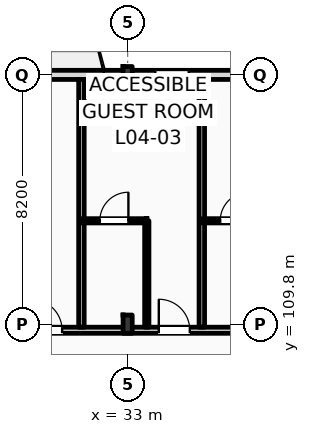
"""IFC4 building model, lengths in metres.
Left out: names, types, materials, properties, quantities, classifications, styles, units other than length and angle.
Written with IfcOpenShell. Run it as: python <this file> out.ifc"""

import sys

from ifc_helpers import new_model, si_unit, direction, frame, frame_2d, origin, origin_2d, place, context, subcontext, project, spatial, rectangle, i_section, extrude, element, fill, save


model = new_model("IFC4")
c1 = context("Model", 3, precision=1e-05, world=origin(), true_north=direction((0.0, 1.0)))
c2 = subcontext(c1, "Body", "Model", "MODEL_VIEW")
j1 = project(units=[si_unit("LENGTHUNIT", "METRE"), si_unit("PLANEANGLEUNIT", "RADIAN")], contexts=[c1])
p1 = place(None, origin())
s1 = spatial("IfcSite", under=j1, at=p1, CompositionType="ELEMENT")
p2 = place(p1, origin())
s2 = spatial("IfcBuilding", under=s1, at=p2, CompositionType="ELEMENT")
p3 = place(p2, frame((0.0, 0.0, 20.4)))
s3 = spatial("IfcBuildingStorey", under=s2, at=p3, CompositionType="ELEMENT", Elevation=20.4)
p4 = place(p3, frame((33.0, 109.8, 0.0), z_axis=(0.0, 0.0, 1.0), x_axis=(1.0, 0.0, 0.0)))
e1 = element("IfcColumn", 1, at=p4, inside=s3, PredefinedType="COLUMN", context=c2, shape_type="SweptSolid", body=[
    extrude(i_section(OverallWidth=0.3, OverallDepth=0.6, WebThickness=0.015, FlangeThickness=0.03, FilletRadius=0.027, at=origin_2d()), origin(), (0.0, 0.0, 1.0), 4.2),
])
p5 = place(p3, frame((33.0, 118.0, 0.0), z_axis=(0.0, 0.0, 1.0), x_axis=(1.0, 0.0, 0.0)))
e2 = element("IfcColumn", 2, at=p5, inside=s3, PredefinedType="COLUMN", context=c2, shape_type="SweptSolid", body=[
    extrude(i_section(OverallWidth=0.3, OverallDepth=0.55, WebThickness=0.015, FlangeThickness=0.029, FilletRadius=0.027, at=origin_2d()), origin(), (0.0, 0.0, 1.0), 4.2),
])
p6 = place(p3, frame((22.5, 118.0, 0.0), z_axis=(0.0, 0.0, 1.0), x_axis=(1.0, 0.0, 0.0)))
e3 = element("IfcWall", 3, at=p6, inside=s3, PredefinedType="STANDARD", context=c2, shape_type="SweptSolid", body=[
    extrude(rectangle(XDim=97.5, YDim=0.3, at=frame_2d((48.75, 0.0))), origin(), (0.0, 0.0, 1.0), 3.38),
])
p7 = place(p6, frame((0.91, 0.0, 0.9)))
e4 = element("IfcOpeningElement", 4, at=p7, cuts=e3, PredefinedType="OPENING", context=c2, shape_type="SweptSolid", body=[
    extrude(rectangle(XDim=0.9, YDim=1.8, at=frame_2d((0.45, 0.9))), frame((0.0, 0.16, 0.0), z_axis=(0.0, -1.0, 0.0), x_axis=(1.0, 0.0, 0.0)), (0.0, 0.0, 1.0), 0.32),
])
p8 = place(p6, frame((6.36, 0.0, 0.0)))
e5 = element("IfcOpeningElement", 5, at=p8, cuts=e3, PredefinedType="OPENING", context=c2, shape_type="SweptSolid", body=[
    extrude(rectangle(XDim=1.2, YDim=2.25, at=frame_2d((0.6, 1.125))), frame((0.0, 0.16, 0.0), z_axis=(0.0, -1.0, 0.0), x_axis=(1.0, 0.0, 0.0)), (0.0, 0.0, 1.0), 0.32),
])
p9 = place(p6, frame((11.41, 0.0, 0.9)))
e6 = element("IfcOpeningElement", 6, at=p9, cuts=e3, PredefinedType="OPENING", context=c2, shape_type="SweptSolid", body=[
    extrude(rectangle(XDim=1.1, YDim=1.9, at=frame_2d((0.55, 0.95))), frame((0.0, 0.16, 0.0), z_axis=(0.0, -1.0, 0.0), x_axis=(1.0, 0.0, 0.0)), (0.0, 0.0, 1.0), 0.32),
])
p10 = place(p6, frame((14.335, 0.0, 0.9)))
e7 = element("IfcOpeningElement", 7, at=p10, cuts=e3, PredefinedType="OPENING", context=c2, shape_type="SweptSolid", body=[
    extrude(rectangle(XDim=1.65, YDim=1.95, at=frame_2d((0.825, 0.975))), frame((0.0, 0.16, 0.0), z_axis=(0.0, -1.0, 0.0), x_axis=(1.0, 0.0, 0.0)), (0.0, 0.0, 1.0), 0.32),
])
p11 = place(p6, frame((19.26, 0.0, 0.9)))
e8 = element("IfcOpeningElement", 8, at=p11, cuts=e3, PredefinedType="OPENING", context=c2, shape_type="SweptSolid", body=[
    extrude(rectangle(XDim=1.35, YDim=2.0, at=frame_2d((0.675, 1.0))), frame((0.0, 0.16, 0.0), z_axis=(0.0, -1.0, 0.0), x_axis=(1.0, 0.0, 0.0)), (0.0, 0.0, 1.0), 0.32),
])
p12 = place(p6, frame((22.8, 0.0, 0.0)))
e9 = element("IfcOpeningElement", 9, at=p12, cuts=e3, PredefinedType="OPENING", context=c2, shape_type="SweptSolid", body=[
    extrude(rectangle(XDim=1.2, YDim=2.25, at=frame_2d((0.6, 1.125))), frame((0.0, 0.16, 0.0), z_axis=(0.0, -1.0, 0.0), x_axis=(1.0, 0.0, 0.0)), (0.0, 0.0, 1.0), 0.32),
])
p13 = place(p6, frame((26.91, 0.0, 0.9)))
e10 = element("IfcOpeningElement", 10, at=p13, cuts=e3, PredefinedType="OPENING", context=c2, shape_type="SweptSolid", body=[
    extrude(rectangle(XDim=2.1, YDim=2.1, at=frame_2d((1.05, 1.05))), frame((0.0, 0.16, 0.0), z_axis=(0.0, -1.0, 0.0), x_axis=(1.0, 0.0, 0.0)), (0.0, 0.0, 1.0), 0.32),
])
p14 = place(p6, frame((30.835, 0.0, 0.9)))
e11 = element("IfcOpeningElement", 11, at=p14, cuts=e3, PredefinedType="OPENING", context=c2, shape_type="SweptSolid", body=[
    extrude(rectangle(XDim=2.25, YDim=2.15, at=frame_2d((1.125, 1.075))), frame((0.0, 0.16, 0.0), z_axis=(0.0, -1.0, 0.0), x_axis=(1.0, 0.0, 0.0)), (0.0, 0.0, 1.0), 0.32),
])
p15 = place(p6, frame((34.96, 0.0, 0.9)))
e12 = element("IfcOpeningElement", 12, at=p15, cuts=e3, PredefinedType="OPENING", context=c2, shape_type="SweptSolid", body=[
    extrude(rectangle(XDim=2.4, YDim=2.2, at=frame_2d((1.2, 1.1))), frame((0.0, 0.16, 0.0), z_axis=(0.0, -1.0, 0.0), x_axis=(1.0, 0.0, 0.0)), (0.0, 0.0, 1.0), 0.32),
])
p16 = place(p6, frame((39.0, 0.0, 0.0)))
e13 = element("IfcOpeningElement", 13, at=p16, cuts=e3, PredefinedType="OPENING", context=c2, shape_type="SweptSolid", body=[
    extrude(rectangle(XDim=1.2, YDim=2.25, at=frame_2d((0.6, 1.125))), frame((0.0, 0.16, 0.0), z_axis=(0.0, -1.0, 0.0), x_axis=(1.0, 0.0, 0.0)), (0.0, 0.0, 1.0), 0.32),
])
p17 = place(p6, frame((43.21, 0.0, 0.9)))
e14 = element("IfcOpeningElement", 14, at=p17, cuts=e3, PredefinedType="OPENING", context=c2, shape_type="SweptSolid", body=[
    extrude(rectangle(XDim=2.7, YDim=2.3, at=frame_2d((1.35, 1.15))), frame((0.0, 0.16, 0.0), z_axis=(0.0, -1.0, 0.0), x_axis=(1.0, 0.0, 0.0)), (0.0, 0.0, 1.0), 0.32),
])
p18 = place(p6, frame((47.335, 0.0, 0.9)))
e15 = element("IfcOpeningElement", 15, at=p18, cuts=e3, PredefinedType="OPENING", context=c2, shape_type="SweptSolid", body=[
    extrude(rectangle(XDim=1.35, YDim=2.3, at=frame_2d((0.675, 1.15))), frame((0.0, 0.16, 0.0), z_axis=(0.0, -1.0, 0.0), x_axis=(1.0, 0.0, 0.0)), (0.0, 0.0, 1.0), 0.32),
])
p19 = place(p6, frame((52.74, 0.0, 0.0)))
e16 = element("IfcOpeningElement", 16, at=p19, cuts=e3, PredefinedType="OPENING", context=c2, shape_type="SweptSolid", body=[
    extrude(rectangle(XDim=1.2, YDim=2.25, at=frame_2d((0.6, 1.125))), frame((0.0, 0.16, 0.0), z_axis=(0.0, -1.0, 0.0), x_axis=(1.0, 0.0, 0.0)), (0.0, 0.0, 1.0), 0.32),
])
p20 = place(p6, frame((55.36, 0.0, 0.9)))
e17 = element("IfcOpeningElement", 17, at=p20, cuts=e3, PredefinedType="OPENING", context=c2, shape_type="SweptSolid", body=[
    extrude(rectangle(XDim=1.1, YDim=2.3, at=frame_2d((0.55, 1.15))), frame((0.0, 0.16, 0.0), z_axis=(0.0, -1.0, 0.0), x_axis=(1.0, 0.0, 0.0)), (0.0, 0.0, 1.0), 0.32),
])
p21 = place(p6, frame((59.99, 0.0, 0.9)))
e18 = element("IfcOpeningElement", 18, at=p21, cuts=e3, PredefinedType="OPENING", context=c2, shape_type="SweptSolid", body=[
    extrude(rectangle(XDim=2.74, YDim=2.3, at=frame_2d((1.37, 1.15))), frame((0.0, 0.16, 0.0), z_axis=(0.0, -1.0, 0.0), x_axis=(1.0, 0.0, 0.0)), (0.0, 0.0, 1.0), 0.32),
])
p22 = place(p6, frame((65.95, 0.0, 0.9)))
e19 = element("IfcOpeningElement", 19, at=p22, cuts=e3, PredefinedType="OPENING", context=c2, shape_type="SweptSolid", body=[
    extrude(rectangle(XDim=1.35, YDim=2.3, at=frame_2d((0.675, 1.15))), frame((0.0, 0.16, 0.0), z_axis=(0.0, -1.0, 0.0), x_axis=(1.0, 0.0, 0.0)), (0.0, 0.0, 1.0), 0.32),
])
p23 = place(p6, frame((69.16, 0.0, 0.0)))
e20 = element("IfcOpeningElement", 20, at=p23, cuts=e3, PredefinedType="OPENING", context=c2, shape_type="SweptSolid", body=[
    extrude(rectangle(XDim=1.2, YDim=2.25, at=frame_2d((0.6, 1.125))), frame((0.0, 0.16, 0.0), z_axis=(0.0, -1.0, 0.0), x_axis=(1.0, 0.0, 0.0)), (0.0, 0.0, 1.0), 0.32),
])
p24 = place(p6, frame((73.75, 0.0, 0.9)))
e21 = element("IfcOpeningElement", 21, at=p24, cuts=e3, PredefinedType="OPENING", context=c2, shape_type="SweptSolid", body=[
    extrude(rectangle(XDim=1.8, YDim=2.3, at=frame_2d((0.9, 1.15))), frame((0.0, 0.16, 0.0), z_axis=(0.0, -1.0, 0.0), x_axis=(1.0, 0.0, 0.0)), (0.0, 0.0, 1.0), 0.32),
])
p25 = place(p6, frame((76.79, 0.0, 0.9)))
e22 = element("IfcOpeningElement", 22, at=p25, cuts=e3, PredefinedType="OPENING", context=c2, shape_type="SweptSolid", body=[
    extrude(rectangle(XDim=2.74, YDim=2.3, at=frame_2d((1.37, 1.15))), frame((0.0, 0.16, 0.0), z_axis=(0.0, -1.0, 0.0), x_axis=(1.0, 0.0, 0.0)), (0.0, 0.0, 1.0), 0.32),
])
p26 = place(p6, frame((81.55, 0.0, 0.9)))
e23 = element("IfcOpeningElement", 23, at=p26, cuts=e3, PredefinedType="OPENING", context=c2, shape_type="SweptSolid", body=[
    extrude(rectangle(XDim=1.8, YDim=2.3, at=frame_2d((0.9, 1.15))), frame((0.0, 0.16, 0.0), z_axis=(0.0, -1.0, 0.0), x_axis=(1.0, 0.0, 0.0)), (0.0, 0.0, 1.0), 0.32),
])
p27 = place(p6, frame((86.01, 0.0, 0.9)))
e24 = element("IfcOpeningElement", 24, at=p27, cuts=e3, PredefinedType="OPENING", context=c2, shape_type="SweptSolid", body=[
    extrude(rectangle(XDim=1.1, YDim=1.5, at=frame_2d((0.55, 0.75))), frame((0.0, 0.16, 0.0), z_axis=(0.0, -1.0, 0.0), x_axis=(1.0, 0.0, 0.0)), (0.0, 0.0, 1.0), 0.32),
])
p28 = place(p6, frame((90.135, 0.0, 0.9)))
e25 = element("IfcOpeningElement", 25, at=p28, cuts=e3, PredefinedType="OPENING", context=c2, shape_type="SweptSolid", body=[
    extrude(rectangle(XDim=1.25, YDim=1.6, at=frame_2d((0.625, 0.8))), frame((0.0, 0.16, 0.0), z_axis=(0.0, -1.0, 0.0), x_axis=(1.0, 0.0, 0.0)), (0.0, 0.0, 1.0), 0.32),
])
p29 = place(p6, frame((94.34, 0.0, 0.9)))
e26 = element("IfcOpeningElement", 26, at=p29, cuts=e3, PredefinedType="OPENING", context=c2, shape_type="SweptSolid", body=[
    extrude(rectangle(XDim=1.4, YDim=1.7, at=frame_2d((0.7, 0.85))), frame((0.0, 0.16, 0.0), z_axis=(0.0, -1.0, 0.0), x_axis=(1.0, 0.0, 0.0)), (0.0, 0.0, 1.0), 0.32),
])
p30 = place(p3, frame((10.65, 109.6, 0.0), z_axis=(0.0, 0.0, 1.0), x_axis=(1.0, 0.0, 0.0)))
e27 = element("IfcWall", 27, at=p30, inside=s3, PredefinedType="PARTITIONING", context=c2, shape_type="SweptSolid", body=[
    extrude(rectangle(XDim=109.21, YDim=0.2, at=frame_2d((54.605, 0.0))), origin(), (0.0, 0.0, 1.0), 3.38),
])
p31 = place(p30, frame((12.535, 0.0, 0.0)))
e28 = element("IfcOpeningElement", 28, at=p31, cuts=e27, PredefinedType="OPENING", context=c2, shape_type="SweptSolid", body=[
    extrude(rectangle(XDim=1.02, YDim=2.2, at=frame_2d((0.51, 1.1))), frame((0.0, 0.11, 0.0), z_axis=(0.0, -1.0, 0.0), x_axis=(1.0, 0.0, 0.0)), (0.0, 0.0, 1.0), 0.22),
])
p32 = place(p30, frame((19.175, 0.0, 0.0)))
e29 = element("IfcOpeningElement", 29, at=p32, cuts=e27, PredefinedType="OPENING", context=c2, shape_type="SweptSolid", body=[
    extrude(rectangle(XDim=1.02, YDim=2.2, at=frame_2d((0.51, 1.1))), frame((0.0, 0.11, 0.0), z_axis=(0.0, -1.0, 0.0), x_axis=(1.0, 0.0, 0.0)), (0.0, 0.0, 1.0), 0.22),
])
p33 = place(p30, frame((23.375, 0.0, 0.0)))
e30 = element("IfcOpeningElement", 30, at=p33, cuts=e27, PredefinedType="OPENING", context=c2, shape_type="SweptSolid", body=[
    extrude(rectangle(XDim=1.02, YDim=2.2, at=frame_2d((0.51, 1.1))), frame((0.0, 0.11, 0.0), z_axis=(0.0, -1.0, 0.0), x_axis=(1.0, 0.0, 0.0)), (0.0, 0.0, 1.0), 0.22),
])
p34 = place(p30, frame((27.575, 0.0, 0.0)))
e31 = element("IfcOpeningElement", 31, at=p34, cuts=e27, PredefinedType="OPENING", context=c2, shape_type="SweptSolid", body=[
    extrude(rectangle(XDim=1.02, YDim=2.2, at=frame_2d((0.51, 1.1))), frame((0.0, 0.11, 0.0), z_axis=(0.0, -1.0, 0.0), x_axis=(1.0, 0.0, 0.0)), (0.0, 0.0, 1.0), 0.22),
])
p35 = place(p30, frame((31.805, 0.0, 0.0)))
e32 = element("IfcOpeningElement", 32, at=p35, cuts=e27, PredefinedType="OPENING", context=c2, shape_type="SweptSolid", body=[
    extrude(rectangle(XDim=0.96, YDim=2.2, at=frame_2d((0.48, 1.1))), frame((0.0, 0.11, 0.0), z_axis=(0.0, -1.0, 0.0), x_axis=(1.0, 0.0, 0.0)), (0.0, 0.0, 1.0), 0.22),
])
p36 = place(p30, frame((33.855, 0.0, 0.0)))
e33 = element("IfcOpeningElement", 33, at=p36, cuts=e27, PredefinedType="OPENING", context=c2, shape_type="SweptSolid", body=[
    extrude(rectangle(XDim=0.96, YDim=2.2, at=frame_2d((0.48, 1.1))), frame((0.0, 0.11, 0.0), z_axis=(0.0, -1.0, 0.0), x_axis=(1.0, 0.0, 0.0)), (0.0, 0.0, 1.0), 0.22),
])
p37 = place(p30, frame((40.205, 0.0, 0.0)))
e34 = element("IfcOpeningElement", 34, at=p37, cuts=e27, PredefinedType="OPENING", context=c2, shape_type="SweptSolid", body=[
    extrude(rectangle(XDim=0.96, YDim=2.2, at=frame_2d((0.48, 1.1))), frame((0.0, 0.11, 0.0), z_axis=(0.0, -1.0, 0.0), x_axis=(1.0, 0.0, 0.0)), (0.0, 0.0, 1.0), 0.22),
])
p38 = place(p30, frame((42.255, 0.0, 0.0)))
e35 = element("IfcOpeningElement", 35, at=p38, cuts=e27, PredefinedType="OPENING", context=c2, shape_type="SweptSolid", body=[
    extrude(rectangle(XDim=0.96, YDim=2.2, at=frame_2d((0.48, 1.1))), frame((0.0, 0.11, 0.0), z_axis=(0.0, -1.0, 0.0), x_axis=(1.0, 0.0, 0.0)), (0.0, 0.0, 1.0), 0.22),
])
p39 = place(p30, frame((48.605, 0.0, 0.0)))
e36 = element("IfcOpeningElement", 36, at=p39, cuts=e27, PredefinedType="OPENING", context=c2, shape_type="SweptSolid", body=[
    extrude(rectangle(XDim=0.96, YDim=2.2, at=frame_2d((0.48, 1.1))), frame((0.0, 0.11, 0.0), z_axis=(0.0, -1.0, 0.0), x_axis=(1.0, 0.0, 0.0)), (0.0, 0.0, 1.0), 0.22),
])
p40 = place(p30, frame((50.655, 0.0, 0.0)))
e37 = element("IfcOpeningElement", 37, at=p40, cuts=e27, PredefinedType="OPENING", context=c2, shape_type="SweptSolid", body=[
    extrude(rectangle(XDim=0.96, YDim=2.2, at=frame_2d((0.48, 1.1))), frame((0.0, 0.11, 0.0), z_axis=(0.0, -1.0, 0.0), x_axis=(1.0, 0.0, 0.0)), (0.0, 0.0, 1.0), 0.22),
])
p41 = place(p30, frame((57.005, 0.0, 0.0)))
e38 = element("IfcOpeningElement", 38, at=p41, cuts=e27, PredefinedType="OPENING", context=c2, shape_type="SweptSolid", body=[
    extrude(rectangle(XDim=0.96, YDim=2.2, at=frame_2d((0.48, 1.1))), frame((0.0, 0.11, 0.0), z_axis=(0.0, -1.0, 0.0), x_axis=(1.0, 0.0, 0.0)), (0.0, 0.0, 1.0), 0.22),
])
p42 = place(p30, frame((59.055, 0.0, 0.0)))
e39 = element("IfcOpeningElement", 39, at=p42, cuts=e27, PredefinedType="OPENING", context=c2, shape_type="SweptSolid", body=[
    extrude(rectangle(XDim=0.96, YDim=2.2, at=frame_2d((0.48, 1.1))), frame((0.0, 0.11, 0.0), z_axis=(0.0, -1.0, 0.0), x_axis=(1.0, 0.0, 0.0)), (0.0, 0.0, 1.0), 0.22),
])
p43 = place(p30, frame((65.405, 0.0, 0.0)))
e40 = element("IfcOpeningElement", 40, at=p43, cuts=e27, PredefinedType="OPENING", context=c2, shape_type="SweptSolid", body=[
    extrude(rectangle(XDim=0.96, YDim=2.2, at=frame_2d((0.48, 1.1))), frame((0.0, 0.11, 0.0), z_axis=(0.0, -1.0, 0.0), x_axis=(1.0, 0.0, 0.0)), (0.0, 0.0, 1.0), 0.22),
])
p44 = place(p30, frame((67.205, 0.0, 0.0)))
e41 = element("IfcOpeningElement", 41, at=p44, cuts=e27, PredefinedType="OPENING", context=c2, shape_type="SweptSolid", body=[
    extrude(rectangle(XDim=0.96, YDim=2.2, at=frame_2d((0.48, 1.1))), frame((0.0, 0.11, 0.0), z_axis=(0.0, -1.0, 0.0), x_axis=(1.0, 0.0, 0.0)), (0.0, 0.0, 1.0), 0.22),
])
p45 = place(p30, frame((73.805, 0.0, 0.0)))
e42 = element("IfcOpeningElement", 42, at=p45, cuts=e27, PredefinedType="OPENING", context=c2, shape_type="SweptSolid", body=[
    extrude(rectangle(XDim=0.96, YDim=2.2, at=frame_2d((0.48, 1.1))), frame((0.0, 0.11, 0.0), z_axis=(0.0, -1.0, 0.0), x_axis=(1.0, 0.0, 0.0)), (0.0, 0.0, 1.0), 0.22),
])
p46 = place(p30, frame((78.255, 0.0, 0.0)))
e43 = element("IfcOpeningElement", 43, at=p46, cuts=e27, PredefinedType="OPENING", context=c2, shape_type="SweptSolid", body=[
    extrude(rectangle(XDim=0.96, YDim=2.2, at=frame_2d((0.48, 1.1))), frame((0.0, 0.11, 0.0), z_axis=(0.0, -1.0, 0.0), x_axis=(1.0, 0.0, 0.0)), (0.0, 0.0, 1.0), 0.22),
])
p47 = place(p30, frame((82.205, 0.0, 0.0)))
e44 = element("IfcOpeningElement", 44, at=p47, cuts=e27, PredefinedType="OPENING", context=c2, shape_type="SweptSolid", body=[
    extrude(rectangle(XDim=0.96, YDim=2.2, at=frame_2d((0.48, 1.1))), frame((0.0, 0.11, 0.0), z_axis=(0.0, -1.0, 0.0), x_axis=(1.0, 0.0, 0.0)), (0.0, 0.0, 1.0), 0.22),
])
p48 = place(p30, frame((86.405, 0.0, 0.0)))
e45 = element("IfcOpeningElement", 45, at=p48, cuts=e27, PredefinedType="OPENING", context=c2, shape_type="SweptSolid", body=[
    extrude(rectangle(XDim=0.96, YDim=2.2, at=frame_2d((0.48, 1.1))), frame((0.0, 0.11, 0.0), z_axis=(0.0, -1.0, 0.0), x_axis=(1.0, 0.0, 0.0)), (0.0, 0.0, 1.0), 0.22),
])
p49 = place(p30, frame((90.605, 0.0, 0.0)))
e46 = element("IfcOpeningElement", 46, at=p49, cuts=e27, PredefinedType="OPENING", context=c2, shape_type="SweptSolid", body=[
    extrude(rectangle(XDim=0.96, YDim=2.2, at=frame_2d((0.48, 1.1))), frame((0.0, 0.11, 0.0), z_axis=(0.0, -1.0, 0.0), x_axis=(1.0, 0.0, 0.0)), (0.0, 0.0, 1.0), 0.22),
])
p50 = place(p30, frame((94.805, 0.0, 0.0)))
e47 = element("IfcOpeningElement", 47, at=p50, cuts=e27, PredefinedType="OPENING", context=c2, shape_type="SweptSolid", body=[
    extrude(rectangle(XDim=0.96, YDim=2.2, at=frame_2d((0.48, 1.1))), frame((0.0, 0.11, 0.0), z_axis=(0.0, -1.0, 0.0), x_axis=(1.0, 0.0, 0.0)), (0.0, 0.0, 1.0), 0.22),
])
p51 = place(p30, frame((99.005, 0.0, 0.0)))
e48 = element("IfcOpeningElement", 48, at=p51, cuts=e27, PredefinedType="OPENING", context=c2, shape_type="SweptSolid", body=[
    extrude(rectangle(XDim=0.96, YDim=2.2, at=frame_2d((0.48, 1.1))), frame((0.0, 0.11, 0.0), z_axis=(0.0, -1.0, 0.0), x_axis=(1.0, 0.0, 0.0)), (0.0, 0.0, 1.0), 0.22),
])
p52 = place(p30, frame((103.205, 0.0, 0.0)))
e49 = element("IfcOpeningElement", 49, at=p52, cuts=e27, PredefinedType="OPENING", context=c2, shape_type="SweptSolid", body=[
    extrude(rectangle(XDim=0.96, YDim=2.2, at=frame_2d((0.48, 1.1))), frame((0.0, 0.11, 0.0), z_axis=(0.0, -1.0, 0.0), x_axis=(1.0, 0.0, 0.0)), (0.0, 0.0, 1.0), 0.22),
])
p53 = place(p30, frame((105.335, 0.0, 0.0)))
e50 = element("IfcOpeningElement", 50, at=p53, cuts=e27, PredefinedType="OPENING", context=c2, shape_type="SweptSolid", body=[
    extrude(rectangle(XDim=0.96, YDim=2.2, at=frame_2d((0.48, 1.1))), frame((0.0, 0.11, 0.0), z_axis=(0.0, -1.0, 0.0), x_axis=(1.0, 0.0, 0.0)), (0.0, 0.0, 1.0), 0.22),
])
p54 = place(p30, frame((2.716, 0.0, 0.0)))
e51 = element("IfcOpeningElement", 51, at=p54, cuts=e27, PredefinedType="OPENING", context=c2, shape_type="SweptSolid", body=[
    extrude(rectangle(XDim=1.35, YDim=2.25, at=frame_2d((0.675, 1.125))), frame((0.0, 0.11, 0.0), z_axis=(0.0, -1.0, 0.0), x_axis=(1.0, 0.0, 0.0)), (0.0, 0.0, 1.0), 0.22),
])
p55 = place(p30, frame((6.65, 0.0, 0.0)))
e52 = element("IfcOpeningElement", 52, at=p55, cuts=e27, PredefinedType="OPENING", context=c2, shape_type="SweptSolid", body=[
    extrude(rectangle(XDim=1.35, YDim=2.25, at=frame_2d((0.675, 1.125))), frame((0.0, 0.11, 0.0), z_axis=(0.0, -1.0, 0.0), x_axis=(1.0, 0.0, 0.0)), (0.0, 0.0, 1.0), 0.22),
])
p56 = place(p30, frame((10.583, 0.0, 0.0)))
e53 = element("IfcOpeningElement", 53, at=p56, cuts=e27, PredefinedType="OPENING", context=c2, shape_type="SweptSolid", body=[
    extrude(rectangle(XDim=1.35, YDim=2.25, at=frame_2d((0.675, 1.125))), frame((0.0, 0.11, 0.0), z_axis=(0.0, -1.0, 0.0), x_axis=(1.0, 0.0, 0.0)), (0.0, 0.0, 1.0), 0.22),
])
p57 = place(p3, frame((31.48, 109.7, 0.0), z_axis=(0.0, 0.0, 1.0), x_axis=(0.0, 1.0, 0.0)))
e54 = element("IfcWall", 54, at=p57, inside=s3, PredefinedType="PARTITIONING", context=c2, shape_type="SweptSolid", body=[
    extrude(rectangle(XDim=8.15, YDim=0.18, at=frame_2d((4.075, 0.0))), origin(), (0.0, 0.0, 1.0), 3.94),
])
p58 = place(p3, frame((35.44, 109.7, 0.0), z_axis=(0.0, 0.0, 1.0), x_axis=(0.0, 1.0, 0.0)))
e55 = element("IfcWall", 55, at=p58, inside=s3, PredefinedType="PARTITIONING", context=c2, shape_type="SweptSolid", body=[
    extrude(rectangle(XDim=8.15, YDim=0.18, at=frame_2d((4.075, 0.0))), origin(), (0.0, 0.0, 1.0), 3.63),
])
p59 = place(p3, frame((33.63, 109.7, 0.0), z_axis=(0.0, 0.0, 1.0), x_axis=(0.0, 1.0, 0.0)))
e56 = element("IfcWall", 56, at=p59, inside=s3, PredefinedType="PARTITIONING", context=c2, shape_type="SweptSolid", body=[
    extrude(rectangle(XDim=3.5, YDim=0.14, at=frame_2d((1.75, 0.0))), origin(), (0.0, 0.0, 1.0), 3.94),
])
p60 = place(p3, frame((31.48, 113.2, 0.0), z_axis=(0.0, 0.0, 1.0), x_axis=(1.0, 0.0, 0.0)))
e57 = element("IfcWall", 57, at=p60, inside=s3, PredefinedType="PARTITIONING", context=c2, shape_type="SweptSolid", body=[
    extrude(rectangle(XDim=2.15, YDim=0.14, at=frame_2d((1.075, 0.0))), origin(), (0.0, 0.0, 1.0), 3.94),
])
p61 = place(p60, frame((0.605, 0.0, 0.0)))
e58 = element("IfcOpeningElement", 58, at=p61, cuts=e57, PredefinedType="OPENING", context=c2, shape_type="SweptSolid", body=[
    extrude(rectangle(XDim=0.94, YDim=2.15, at=frame_2d((0.47, 1.075))), frame((0.0, 0.08, 0.0), z_axis=(0.0, -1.0, 0.0), x_axis=(1.0, 0.0, 0.0)), (0.0, 0.0, 1.0), 0.16),
])
p62 = place(p3, frame((35.44, 113.2, 0.0), z_axis=(0.0, 0.0, 1.0), x_axis=(1.0, 0.0, 0.0)))
e59 = element("IfcWall", 59, at=p62, inside=s3, PredefinedType="PARTITIONING", context=c2, shape_type="SweptSolid", body=[
    extrude(rectangle(XDim=2.15, YDim=0.14, at=frame_2d((1.075, 0.0))), origin(), (0.0, 0.0, 1.0), 3.94),
])
p63 = place(p62, frame((0.605, 0.0, 0.0)))
e60 = element("IfcOpeningElement", 60, at=p63, cuts=e59, PredefinedType="OPENING", context=c2, shape_type="SweptSolid", body=[
    extrude(rectangle(XDim=0.94, YDim=2.15, at=frame_2d((0.47, 1.075))), frame((0.0, 0.08, 0.0), z_axis=(0.0, -1.0, 0.0), x_axis=(1.0, 0.0, 0.0)), (0.0, 0.0, 1.0), 0.16),
])
p64 = place(p9, origin())
e61 = element("IfcWindow", 61, at=p64, inside=s3, PartitioningType="DOUBLE_PANEL_VERTICAL", PredefinedType="WINDOW", context=c2, shape_type="SweptSolid", body=[
    extrude(rectangle(XDim=1.1, YDim=1.9, at=frame_2d((0.55, 0.95))), frame((0.0, 0.03, 0.0), z_axis=(0.0, -1.0, 0.0), x_axis=(1.0, 0.0, 0.0)), (0.0, 0.0, 1.0), 0.06),
])
fill(e6, e61)
p65 = place(p32, origin())
e62 = element("IfcDoor", 62, at=p65, inside=s3, OperationType="SINGLE_SWING_LEFT", PredefinedType="DOOR", context=c2, shape_type="SweptSolid", body=[
    extrude(rectangle(XDim=1.02, YDim=2.2, at=frame_2d((0.51, 1.1))), frame((0.0, 0.025, 0.0), z_axis=(0.0, -1.0, 0.0), x_axis=(1.0, 0.0, 0.0)), (0.0, 0.0, 1.0), 0.05),
])
fill(e29, e62)
p66 = place(p33, origin())
e63 = element("IfcDoor", 63, at=p66, inside=s3, OperationType="SINGLE_SWING_LEFT", PredefinedType="DOOR", context=c2, shape_type="SweptSolid", body=[
    extrude(rectangle(XDim=1.02, YDim=2.2, at=frame_2d((0.51, 1.1))), frame((0.0, 0.025, 0.0), z_axis=(0.0, -1.0, 0.0), x_axis=(1.0, 0.0, 0.0)), (0.0, 0.0, 1.0), 0.05),
])
fill(e30, e63)
p67 = place(p61, origin())
e64 = element("IfcDoor", 64, at=p67, inside=s3, OperationType="SINGLE_SWING_RIGHT", PredefinedType="DOOR", context=c2, shape_type="SweptSolid", body=[
    extrude(rectangle(XDim=0.94, YDim=2.15, at=frame_2d((0.47, 1.075))), frame((0.0, 0.025, 0.0), z_axis=(0.0, -1.0, 0.0), x_axis=(1.0, 0.0, 0.0)), (0.0, 0.0, 1.0), 0.05),
])
fill(e58, e64)
p68 = place(p63, origin())
e65 = element("IfcDoor", 65, at=p68, inside=s3, OperationType="SINGLE_SWING_RIGHT", PredefinedType="DOOR", context=c2, shape_type="SweptSolid", body=[
    extrude(rectangle(XDim=0.94, YDim=2.15, at=frame_2d((0.47, 1.075))), frame((0.0, 0.025, 0.0), z_axis=(0.0, -1.0, 0.0), x_axis=(1.0, 0.0, 0.0)), (0.0, 0.0, 1.0), 0.05),
])
fill(e60, e65)
save(model, sys.argv[1])
